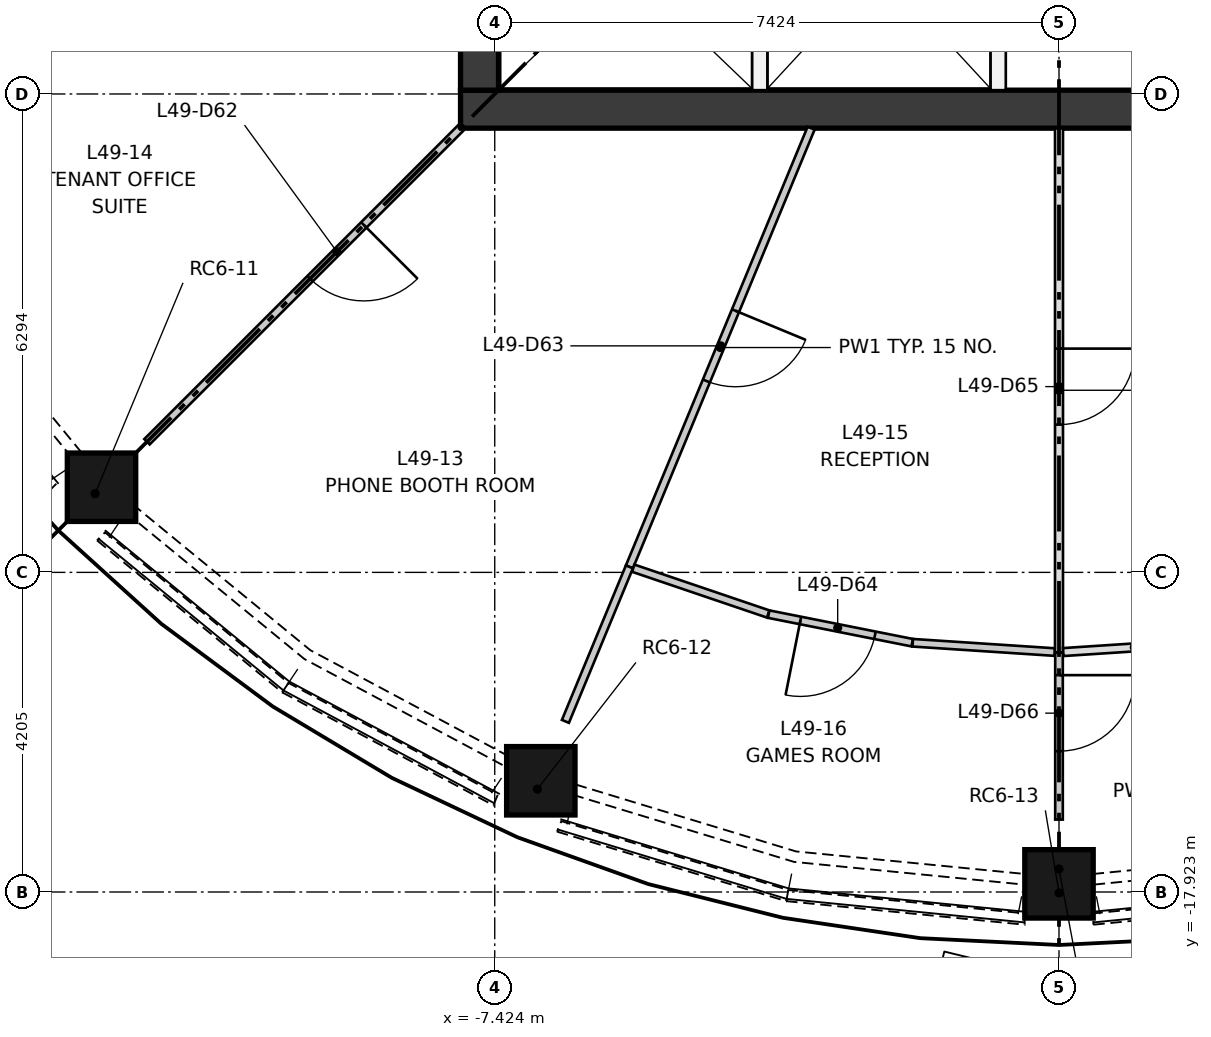
"""IFC4 building model, lengths in metres.
Left out: names, types, materials, properties, quantities, classifications, styles, units other than length and angle.
Written with IfcOpenShell. Run it as: python <this file> out.ifc"""

import sys

from ifc_helpers import new_model, si_unit, direction, frame, frame_2d, origin, origin_2d, place, context, subcontext, project, spatial, polyline, rectangle, outline, extrude, element, fill, save


model = new_model("IFC4")
c1 = context("Model", 3, precision=1e-05, world=origin(), true_north=direction((0.0, 1.0)))
c2 = subcontext(c1, "Body", "Model", "MODEL_VIEW")
j1 = project(units=[si_unit("LENGTHUNIT", "METRE"), si_unit("PLANEANGLEUNIT", "RADIAN")], contexts=[c1])
p1 = place(None, origin())
s1 = spatial("IfcSite", under=j1, at=p1, CompositionType="ELEMENT")
p2 = place(p1, origin())
s2 = spatial("IfcBuilding", under=s1, at=p2, CompositionType="ELEMENT")
p3 = place(p2, frame((0.0, 0.0, 184.3)))
s3 = spatial("IfcBuildingStorey", under=s2, at=p3, CompositionType="ELEMENT", Elevation=184.3)
p4 = place(p3, frame((-12.682, -12.682, 0.5), z_axis=(0.0, 0.0, 1.0), x_axis=(-0.707106781187, 0.707106781187, 0.0)))
e1 = element("IfcColumn", 1, at=p4, inside=s3, PredefinedType="COLUMN", context=c2, shape_type="SweptSolid", body=[
    extrude(rectangle(XDim=0.9, YDim=0.9, at=origin_2d()), origin(), (0.0, -0.168, 0.986), 2.384),
])
p5 = place(p3, frame((-6.863, -16.57, 0.5), z_axis=(0.0, 0.0, 1.0), x_axis=(-0.924120904221, 0.382100188932, 0.0)))
e2 = element("IfcColumn", 2, at=p5, inside=s3, PredefinedType="COLUMN", context=c2, shape_type="SweptSolid", body=[
    extrude(rectangle(XDim=0.9, YDim=0.9, at=origin_2d()), origin(), (0.0, -0.168, 0.986), 2.384),
])
p6 = place(p3, frame((0.0, -17.935, 0.5), z_axis=(0.0, 0.0, 1.0), x_axis=(-1.0, 0.0, 0.0)))
e3 = element("IfcColumn", 3, at=p6, inside=s3, PredefinedType="COLUMN", context=c2, shape_type="SweptSolid", body=[
    extrude(rectangle(XDim=0.9, YDim=0.9, at=origin_2d()), origin(), (0.0, -0.168, 0.986), 2.384),
])
p7 = place(p3, frame((-7.874, -7.624, 0.0), z_axis=(0.0, 0.0, 1.0), x_axis=(1.0, 0.0, 0.0)))
e4 = element("IfcWall", 4, at=p7, inside=s3, PredefinedType="SHEAR", context=c2, shape_type="SweptSolid", body=[
    extrude(rectangle(XDim=15.748, YDim=0.5, at=frame_2d((7.874, 0.0))), origin(), (0.0, 0.0, 1.0), 3.35),
])
p8 = place(p3, frame((-7.624, -7.374, 0.0), z_axis=(0.0, 0.0, 1.0), x_axis=(0.0, 1.0, 0.0)))
e5 = element("IfcWall", 5, at=p8, inside=s3, PredefinedType="SHEAR", context=c2, shape_type="SweptSolid", body=[
    extrude(rectangle(XDim=14.748, YDim=0.5, at=frame_2d((7.374, 0.0))), origin(), (0.0, 0.0, 1.0), 3.35),
])
p9 = place(p8, frame((6.874, 0.0, 0.0)))
e6 = element("IfcOpeningElement", 6, at=p9, cuts=e5, PredefinedType="OPENING", context=c2, shape_type="SweptSolid", body=[
    extrude(rectangle(XDim=1.0, YDim=2.1, at=frame_2d((0.5, 1.05))), frame((0.0, 0.26, 0.0), z_axis=(0.0, -1.0, 0.0), x_axis=(1.0, 0.0, 0.0)), (0.0, 0.0, 1.0), 0.52),
])
p10 = place(p8, frame((3.75, 0.0, 0.0)))
e7 = element("IfcOpeningElement", 7, at=p10, cuts=e5, PredefinedType="OPENING", context=c2, shape_type="SweptSolid", body=[
    extrude(rectangle(XDim=1.8, YDim=2.1, at=frame_2d((0.9, 1.05))), frame((0.0, 0.26, 0.0), z_axis=(0.0, -1.0, 0.0), x_axis=(1.0, 0.0, 0.0)), (0.0, 0.0, 1.0), 0.52),
])
p11 = place(p8, frame((9.198, 0.0, 0.0)))
e8 = element("IfcOpeningElement", 8, at=p11, cuts=e5, PredefinedType="OPENING", context=c2, shape_type="SweptSolid", body=[
    extrude(rectangle(XDim=1.8, YDim=2.1, at=frame_2d((0.9, 1.05))), frame((0.0, 0.26, 0.0), z_axis=(0.0, -1.0, 0.0), x_axis=(1.0, 0.0, 0.0)), (0.0, 0.0, 1.0), 0.52),
])
for number, where, z_axis, x_axis in (
    (9, (-3.937, -7.374, 0.0), (0.0, 0.0, 1.0), (0.0, 1.0, 0.0)),
    (10, (-0.8, -7.374, 0.0), (0.0, 0.0, 1.0), (0.0, 1.0, 0.0)),
):
    element("IfcWall", number, at=place(p3, frame(where, z_axis=z_axis, x_axis=x_axis)), inside=s3, PredefinedType="PARTITIONING", context=c2, shape_type="SweptSolid", body=[
        extrude(rectangle(XDim=3.2, YDim=0.2, at=frame_2d((1.6, 0.0))), origin(), (0.0, 0.0, 1.0), 3.0),
    ])
p12 = place(p3, frame((-15.296, -10.221, 0.0), z_axis=(-0.762829436571, -0.625791219471, 0.162716318582), x_axis=(0.634244680745, -0.773132385109, 6.479811e-06)))
e11 = element("IfcWall", 11, at=p12, inside=s3, PredefinedType="SOLIDWALL", context=c2, shape_type="SweptSolid", body=[
    extrude(outline(polyline([(0.0, 0.0), (3.151, 0.0), (3.137, 0.912), (0.014, 0.912), (0.0, 0.0)])), origin(), (0.0, 0.0, -1.0), 0.3),
])
p13 = place(p3, frame((-12.657, -13.297, 0.0), z_axis=(-0.625801401555, -0.762803450932, 0.162798959018), x_axis=(0.773117144297, -0.634263258583, -2.518315e-06)))
e12 = element("IfcWall", 12, at=p13, inside=s3, PredefinedType="SOLIDWALL", context=c2, shape_type="SweptSolid", body=[
    extrude(outline(polyline([(0.0, 0.0), (3.151, 5.551e-17), (3.137, 0.912), (0.015, 0.912), (0.0, 0.0)])), origin(), (0.0, 0.0, -1.0), 0.3),
])
p14 = place(p3, frame((-10.221, -15.296, 0.0), z_axis=(-0.465338838382, -0.870053087177, 0.162688017342), x_axis=(0.881801348468, -0.471621015005, 6.731272e-06)))
e13 = element("IfcWall", 13, at=p14, inside=s3, PredefinedType="SOLIDWALL", context=c2, shape_type="SweptSolid", body=[
    extrude(outline(polyline([(0.0, 0.0), (3.152, -2.776e-17), (3.137, 0.912), (0.015, 0.912), (0.0, 0.0)])), origin(), (0.0, 0.0, -1.0), 0.3),
])
p15 = place(p3, frame((-6.605, -17.128, 0.0), z_axis=(-0.286447724297, -0.94416395345, 0.162794748846), x_axis=(0.956929514391, -0.290320348038, 1.683956e-06)))
e14 = element("IfcWall", 14, at=p15, inside=s3, PredefinedType="SOLIDWALL", context=c2, shape_type="SweptSolid", body=[
    extrude(outline(polyline([(0.0, 0.0), (3.151, 0.0), (3.137, 0.912), (0.014, 0.912), (0.0, 0.0)])), origin(), (0.0, 0.0, -1.0), 0.3),
])
p16 = place(p3, frame((-3.59, -18.043, 0.0), z_axis=(-0.097001095349, -0.981910573414, 0.162611233681), x_axis=(0.995155966643, -0.098308707783, 5.283619e-06)))
e15 = element("IfcWall", 15, at=p16, inside=s3, PredefinedType="SOLIDWALL", context=c2, shape_type="SweptSolid", body=[
    extrude(outline(polyline([(0.0, 0.0), (3.152, 0.0), (3.138, 0.912), (0.015, 0.912), (0.0, 0.0)])), origin(), (0.0, 0.0, -1.0), 0.3),
])
p17 = place(p3, frame((0.452, -18.353, 0.0), z_axis=(0.096960979381, -0.981893053275, 0.162740899619), x_axis=(0.995159671342, 0.098271198901, 9.28862e-07)))
e16 = element("IfcWall", 16, at=p17, inside=s3, PredefinedType="SOLIDWALL", context=c2, shape_type="SweptSolid", body=[
    extrude(outline(polyline([(0.0, 0.0), (3.152, 1.388e-17), (3.138, 0.912), (0.015, 0.912), (0.0, 0.0)])), origin(), (0.0, 0.0, -1.0), 0.3),
])
p18 = place(p3, frame((-7.874, -7.874, 0.0), z_axis=(0.0, 0.0, 1.0), x_axis=(-0.707106781187, -0.707106781187, 0.0)))
e17 = element("IfcWall", 17, at=p18, inside=s3, PredefinedType="PARTITIONING", context=c2, shape_type="SweptSolid", body=[
    extrude(rectangle(XDim=5.834, YDim=0.1, at=frame_2d((2.917, 0.0))), origin(), (0.0, 0.0, 1.0), 3.0),
])
p19 = place(p18, frame((1.8, 0.0, 0.0)))
e18 = element("IfcOpeningElement", 18, at=p19, cuts=e17, PredefinedType="OPENING", context=c2, shape_type="SweptSolid", body=[
    extrude(rectangle(XDim=1.0, YDim=2.1, at=frame_2d((0.5, 1.05))), frame((0.0, 0.06, 0.0), z_axis=(0.0, -1.0, 0.0), x_axis=(1.0, 0.0, 0.0)), (0.0, 0.0, 1.0), 0.12),
])
p20 = place(p3, frame((-3.261, -7.874, 0.0), z_axis=(0.0, 0.0, 1.0), x_axis=(-0.382669328176, -0.923885374532, 0.0)))
e19 = element("IfcWall", 19, at=p20, inside=s3, PredefinedType="PARTITIONING", context=c2, shape_type="SweptSolid", body=[
    extrude(rectangle(XDim=6.247, YDim=0.1, at=frame_2d((3.124, 0.0))), origin(), (0.0, 0.0, 1.0), 3.0),
])
p21 = place(p20, frame((2.6, 0.0, 0.0)))
e20 = element("IfcOpeningElement", 20, at=p21, cuts=e19, PredefinedType="OPENING", context=c2, shape_type="SweptSolid", body=[
    extrude(rectangle(XDim=1.0, YDim=2.1, at=frame_2d((0.5, 1.05))), frame((0.0, 0.06, 0.0), z_axis=(0.0, -1.0, 0.0), x_axis=(1.0, 0.0, 0.0)), (0.0, 0.0, 1.0), 0.12),
])
p22 = place(p3, frame((-5.652, -13.646, 0.0), z_axis=(0.0, 0.0, 1.0), x_axis=(-0.382747093259, -0.923853160736, 0.0)))
e21 = element("IfcWall", 21, at=p22, inside=s3, PredefinedType="PARTITIONING", context=c2, shape_type="SweptSolid", body=[
    extrude(rectangle(XDim=2.2, YDim=0.1, at=frame_2d((1.1, 0.0))), origin(), (0.0, 0.0, 1.0), 3.0),
])
p23 = place(p3, frame((-3.826, -14.266, 0.0), z_axis=(0.0, 0.0, 1.0), x_axis=(-0.946924217591, 0.321456880686, 0.0)))
e22 = element("IfcWall", 22, at=p23, inside=s3, PredefinedType="PARTITIONING", context=c2, shape_type="SweptSolid", body=[
    extrude(rectangle(XDim=1.875, YDim=0.1, at=frame_2d((0.938, 0.0))), origin(), (0.0, 0.0, 1.0), 3.0),
])
p24 = place(p3, frame((-1.931, -14.643, 0.0), z_axis=(0.0, 0.0, 1.0), x_axis=(-0.980775263006, 0.195140676117, 0.0)))
e23 = element("IfcWall", 23, at=p24, inside=s3, PredefinedType="PARTITIONING", context=c2, shape_type="SweptSolid", body=[
    extrude(rectangle(XDim=1.926, YDim=0.1, at=frame_2d((0.963, 0.0))), origin(), (0.0, 0.0, 1.0), 3.0),
])
p25 = place(p24, frame((0.5, 0.0, 0.0)))
e24 = element("IfcOpeningElement", 24, at=p25, cuts=e23, PredefinedType="OPENING", context=c2, shape_type="SweptSolid", body=[
    extrude(rectangle(XDim=1.0, YDim=2.1, at=frame_2d((0.5, 1.05))), frame((0.0, 0.06, 0.0), z_axis=(0.0, -1.0, 0.0), x_axis=(1.0, 0.0, 0.0)), (0.0, 0.0, 1.0), 0.12),
])
p26 = place(p3, frame((-0.056, -14.766, 0.0), z_axis=(0.0, 0.0, 1.0), x_axis=(-0.997856111695, 0.065446010984, 0.0)))
e25 = element("IfcWall", 25, at=p26, inside=s3, PredefinedType="PARTITIONING", context=c2, shape_type="SweptSolid", body=[
    extrude(rectangle(XDim=1.873, YDim=0.1, at=frame_2d((0.936, 0.0))), origin(), (0.0, 0.0, 1.0), 3.0),
])
p27 = place(p3, frame((0.0, -7.874, 0.0), z_axis=(0.0, 0.0, 1.0), x_axis=(0.0, -1.0, 0.0)))
e26 = element("IfcWall", 26, at=p27, inside=s3, PredefinedType="PARTITIONING", context=c2, shape_type="SweptSolid", body=[
    extrude(rectangle(XDim=6.896, YDim=0.105, at=frame_2d((3.448, 0.0))), origin(), (0.0, 0.0, 1.0), 3.0),
])
p28 = place(p27, frame((2.9, 0.0, 0.0)))
e27 = element("IfcOpeningElement", 27, at=p28, cuts=e26, PredefinedType="OPENING", context=c2, shape_type="SweptSolid", body=[
    extrude(rectangle(XDim=1.0, YDim=2.1, at=frame_2d((0.5, 1.05))), frame((0.0, 0.062, 0.0), z_axis=(0.0, -1.0, 0.0), x_axis=(1.0, 0.0, 0.0)), (0.0, 0.0, 1.0), 0.125),
])
p29 = place(p3, frame((0.0, -14.77, 0.0), z_axis=(0.0, 0.0, 1.0), x_axis=(0.0, -1.0, 0.0)))
e28 = element("IfcWall", 28, at=p29, inside=s3, PredefinedType="PARTITIONING", context=c2, shape_type="SweptSolid", body=[
    extrude(rectangle(XDim=2.2, YDim=0.1, at=frame_2d((1.1, 0.0))), origin(), (0.0, 0.0, 1.0), 3.0),
])
p30 = place(p29, frame((0.3, 0.0, 0.0)))
e29 = element("IfcOpeningElement", 29, at=p30, cuts=e28, PredefinedType="OPENING", context=c2, shape_type="SweptSolid", body=[
    extrude(rectangle(XDim=1.0, YDim=2.1, at=frame_2d((0.5, 1.05))), frame((0.0, 0.06, 0.0), z_axis=(0.0, -1.0, 0.0), x_axis=(1.0, 0.0, 0.0)), (0.0, 0.0, 1.0), 0.12),
])
p31 = place(p3, frame((1.925, -14.644, 0.0), z_axis=(0.0, 0.0, 1.0), x_axis=(-0.997856111695, -0.065446010984, 0.0)))
e30 = element("IfcWall", 30, at=p31, inside=s3, PredefinedType="PARTITIONING", context=c2, shape_type="SweptSolid", body=[
    extrude(rectangle(XDim=1.873, YDim=0.105, at=frame_2d((0.936, 0.0))), origin(), (0.0, 0.0, 1.0), 3.0),
])
p32 = place(p19, origin())
e31 = element("IfcDoor", 31, at=p32, inside=s3, OperationType="SINGLE_SWING_LEFT", PredefinedType="DOOR", context=c2, shape_type="SweptSolid", body=[
    extrude(rectangle(XDim=1.0, YDim=2.1, at=frame_2d((0.5, 1.05))), frame((0.0, 0.025, 0.0), z_axis=(0.0, -1.0, 0.0), x_axis=(1.0, 0.0, 0.0)), (0.0, 0.0, 1.0), 0.05),
])
fill(e18, e31)
p33 = place(p21, origin())
e32 = element("IfcDoor", 32, at=p33, inside=s3, OperationType="SINGLE_SWING_LEFT", PredefinedType="DOOR", context=c2, shape_type="SweptSolid", body=[
    extrude(rectangle(XDim=1.0, YDim=2.1, at=frame_2d((0.5, 1.05))), frame((0.0, 0.025, 0.0), z_axis=(0.0, -1.0, 0.0), x_axis=(1.0, 0.0, 0.0)), (0.0, 0.0, 1.0), 0.05),
])
fill(e20, e32)
p34 = place(p25, origin())
e33 = element("IfcDoor", 33, at=p34, inside=s3, OperationType="SINGLE_SWING_RIGHT", PredefinedType="DOOR", context=c2, shape_type="SweptSolid", body=[
    extrude(rectangle(XDim=1.0, YDim=2.1, at=frame_2d((0.5, 1.05))), frame((0.0, 0.025, 0.0), z_axis=(0.0, -1.0, 0.0), x_axis=(1.0, 0.0, 0.0)), (0.0, 0.0, 1.0), 0.05),
])
fill(e24, e33)
p35 = place(p28, origin())
e34 = element("IfcDoor", 34, at=p35, inside=s3, OperationType="SINGLE_SWING_LEFT", PredefinedType="DOOR", context=c2, shape_type="SweptSolid", body=[
    extrude(rectangle(XDim=1.0, YDim=2.1, at=frame_2d((0.5, 1.05))), frame((0.0, 0.025, 0.0), z_axis=(0.0, -1.0, 0.0), x_axis=(1.0, 0.0, 0.0)), (0.0, 0.0, 1.0), 0.05),
])
fill(e27, e34)
p36 = place(p30, origin())
e35 = element("IfcDoor", 35, at=p36, inside=s3, OperationType="SINGLE_SWING_LEFT", PredefinedType="DOOR", context=c2, shape_type="SweptSolid", body=[
    extrude(rectangle(XDim=1.0, YDim=2.1, at=frame_2d((0.5, 1.05))), frame((0.0, 0.025, 0.0), z_axis=(0.0, -1.0, 0.0), x_axis=(1.0, 0.0, 0.0)), (0.0, 0.0, 1.0), 0.05),
])
fill(e29, e35)
save(model, sys.argv[1])
